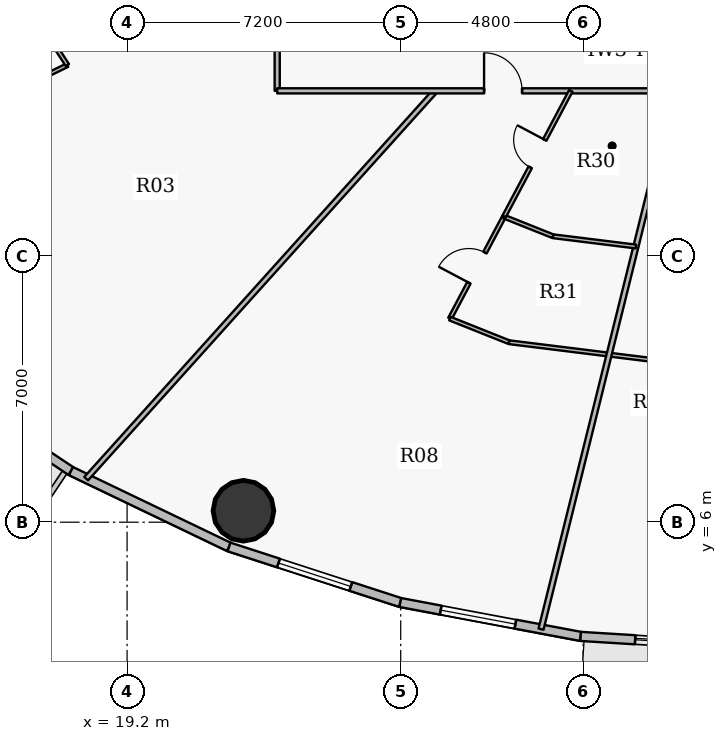
"""IFC4 building model, lengths in metres.
Left out: names, types, materials, properties, quantities, classifications, styles, units other than length and angle.
Written with IfcOpenShell. Run it as: python <this file> out.ifc"""

import sys

from ifc_helpers import new_model, si_unit, direction, frame, frame_2d, origin, origin_2d, place, context, subcontext, project, spatial, rectangle, hollow_circle, extrude, source, transform, mapped, element, fill, save


model = new_model("IFC4")
c1 = context("Model", 3, precision=1e-05, world=origin(), true_north=direction((0.0, 1.0)))
c2 = subcontext(c1, "Body", "Model", "MODEL_VIEW")
j1 = project(units=[si_unit("LENGTHUNIT", "METRE"), si_unit("PLANEANGLEUNIT", "RADIAN")], contexts=[c1])
p1 = place(None, origin())
s1 = spatial("IfcSite", under=j1, at=p1, CompositionType="ELEMENT")
p2 = place(p1, origin())
s2 = spatial("IfcBuilding", under=s1, at=p2, CompositionType="ELEMENT")
p3 = place(p2, frame((0.0, 0.0, 61.8)))
s3 = spatial("IfcBuildingStorey", under=s2, at=p3, CompositionType="ELEMENT", Elevation=61.8)
p4 = place(p3, frame((22.262, 6.301, 0.0), z_axis=(0.0, 0.0, 1.0), x_axis=(1.0, 0.0, 0.0)))
e1 = element("IfcColumn", 1, at=p4, inside=s3, PredefinedType="COLUMN", context=c2, shape_type="SweptSolid", body=[
    extrude(hollow_circle(Radius=0.8, WallThickness=0.045, at=origin_2d()), origin(), (0.0, 0.0, 1.0), 4.2),
])
p5 = place(p3, frame((17.723, 7.344, 0.0), z_axis=(0.0, 0.0, 1.0), x_axis=(-0.831240982525, 0.555912249343, 0.0)))
e2 = element("IfcWall", 2, at=p5, inside=s3, PredefinedType="SOLIDWALL", context=c2, shape_type="SweptSolid", body=[
    extrude(rectangle(XDim=4.46, YDim=0.24, at=frame_2d((2.23, 0.0))), origin(), (0.0, 0.0, 1.0), 3.95),
])
p6 = place(p5, frame((1.23, 0.0, 0.9)))
e3 = element("IfcOpeningElement", 3, at=p6, cuts=e2, PredefinedType="OPENING", context=c2, shape_type="SweptSolid", body=[
    extrude(rectangle(XDim=2.0, YDim=1.75, at=origin_2d()), frame((1.0, 0.13, 0.875), z_axis=(0.0, -1.0, 0.0), x_axis=(1.0, 0.0, 0.0)), (0.0, 0.0, 1.0), 0.26),
])
p7 = place(p3, frame((21.882, 5.349, 0.0), z_axis=(0.0, 0.0, 1.0), x_axis=(-0.901601503137, 0.432567601123, 0.0)))
e4 = element("IfcWall", 4, at=p7, inside=s3, PredefinedType="SOLIDWALL", context=c2, shape_type="SweptSolid", body=[
    extrude(rectangle(XDim=4.613, YDim=0.24, at=frame_2d((2.306, 0.0))), origin(), (0.0, 0.0, 1.0), 3.95),
])
p8 = place(p3, frame((26.389, 3.887, 0.0), z_axis=(0.0, 0.0, 1.0), x_axis=(-0.951207699013, 0.308551313946, 0.0)))
e5 = element("IfcWall", 5, at=p8, inside=s3, PredefinedType="SOLIDWALL", context=c2, shape_type="SweptSolid", body=[
    extrude(rectangle(XDim=4.739, YDim=0.24, at=frame_2d((2.369, 0.0))), origin(), (0.0, 0.0, 1.0), 3.95),
])
p9 = place(p8, frame((1.369, 0.0, 0.9)))
e6 = element("IfcOpeningElement", 6, at=p9, cuts=e5, PredefinedType="OPENING", context=c2, shape_type="SweptSolid", body=[
    extrude(rectangle(XDim=2.0, YDim=1.75, at=origin_2d()), frame((1.0, 0.13, 0.875), z_axis=(0.0, -1.0, 0.0), x_axis=(1.0, 0.0, 0.0)), (0.0, 0.0, 1.0), 0.26),
])
p10 = place(p3, frame((31.135, 2.995, 0.0), z_axis=(0.0, 0.0, 1.0), x_axis=(-0.982791952378, 0.184715939598, 0.0)))
e7 = element("IfcWall", 7, at=p10, inside=s3, PredefinedType="SOLIDWALL", context=c2, shape_type="SweptSolid", body=[
    extrude(rectangle(XDim=4.828, YDim=0.24, at=frame_2d((2.414, 0.0))), origin(), (0.0, 0.0, 1.0), 3.95),
])
p11 = place(p10, frame((1.746, 0.0, 0.9)))
e8 = element("IfcOpeningElement", 8, at=p11, cuts=e7, PredefinedType="OPENING", context=c2, shape_type="SweptSolid", body=[
    extrude(rectangle(XDim=2.0, YDim=1.75, at=origin_2d()), frame((1.0, 0.13, 0.875), z_axis=(0.0, -1.0, 0.0), x_axis=(1.0, 0.0, 0.0)), (0.0, 0.0, 1.0), 0.26),
])
p12 = place(p3, frame((36.0, 2.695, 0.0), z_axis=(0.0, 0.0, 1.0), x_axis=(-0.998106954071, 0.061502099433, 0.0)))
e9 = element("IfcWall", 9, at=p12, inside=s3, PredefinedType="SOLIDWALL", context=c2, shape_type="SweptSolid", body=[
    extrude(rectangle(XDim=4.875, YDim=0.24, at=frame_2d((2.438, 0.0))), origin(), (0.0, 0.0, 1.0), 3.95),
])
p13 = place(p12, frame((1.437, 0.0, 0.9)))
e10 = element("IfcOpeningElement", 10, at=p13, cuts=e9, PredefinedType="OPENING", context=c2, shape_type="SweptSolid", body=[
    extrude(rectangle(XDim=2.0, YDim=1.75, at=origin_2d()), frame((1.0, 0.13, 0.875), z_axis=(0.0, -1.0, 0.0), x_axis=(1.0, 0.0, 0.0)), (0.0, 0.0, 1.0), 0.26),
])
p14 = place(p3, frame((9.719, 14.163, 0.0), z_axis=(0.0, 0.0, 1.0), x_axis=(0.898526567573, 0.438919135339, 0.0)))
e11 = element("IfcWall", 11, at=p14, inside=s3, PredefinedType="PARTITIONING", context=c2, shape_type="SweptSolid", body=[
    extrude(rectangle(XDim=8.803, YDim=0.1, at=frame_2d((4.402, 0.0))), origin(), (0.0, 0.0, 1.0), 3.335),
])
p15 = place(p14, frame((6.191, 0.0, 0.0)))
e12 = element("IfcOpeningElement", 12, at=p15, cuts=e11, PredefinedType="OPENING", context=c2, shape_type="SweptSolid", body=[
    extrude(rectangle(XDim=0.9, YDim=2.1, at=origin_2d()), frame((0.45, 0.06, 1.05), z_axis=(0.0, -1.0, 0.0), x_axis=(1.0, 0.0, 0.0)), (0.0, 0.0, 1.0), 0.12),
])
p16 = place(p14, frame((0.843, 0.0, 0.0)))
e13 = element("IfcOpeningElement", 13, at=p16, cuts=e11, PredefinedType="OPENING", context=c2, shape_type="SweptSolid", body=[
    extrude(rectangle(XDim=0.82, YDim=2.1, at=origin_2d()), frame((0.41, 0.06, 1.05), z_axis=(0.0, -1.0, 0.0), x_axis=(1.0, 0.0, 0.0)), (0.0, 0.0, 1.0), 0.12),
])
p17 = place(p3, frame((15.229, 21.716, 0.0), z_axis=(0.0, 0.0, 1.0), x_axis=(0.545423102052, -0.838160867464, 0.0)))
e14 = element("IfcWall", 14, at=p17, inside=s3, PredefinedType="PARTITIONING", context=c2, shape_type="SweptSolid", body=[
    extrude(rectangle(XDim=4.401, YDim=0.1, at=frame_2d((2.2, 0.0))), origin(), (0.0, 0.0, 1.0), 3.285),
])
p18 = place(p3, frame((18.124, 7.146, 0.0), z_axis=(0.0, 0.0, 1.0), x_axis=(0.669125827692, 0.743149128181, 0.0)))
e15 = element("IfcWall", 15, at=p18, inside=s3, PredefinedType="PARTITIONING", context=c2, shape_type="SweptSolid", body=[
    extrude(rectangle(XDim=13.73, YDim=0.135, at=frame_2d((6.865, 0.0))), origin(), (0.0, 0.0, 1.0), 3.335),
])
p19 = place(p3, frame((23.15, 17.35, 0.0), z_axis=(0.0, 0.0, 1.0), x_axis=(0.0, 1.0, 0.0)))
e16 = element("IfcWall", 16, at=p19, inside=s3, PredefinedType="PARTITIONING", context=c2, shape_type="SweptSolid", body=[
    extrude(rectangle(XDim=6.011, YDim=0.135, at=frame_2d((3.006, 0.0))), origin(), (0.0, 0.0, 1.0), 3.285),
])
p20 = place(p19, frame((2.506, 0.0, 0.0)))
e17 = element("IfcOpeningElement", 17, at=p20, cuts=e16, PredefinedType="OPENING", context=c2, shape_type="SweptSolid", body=[
    extrude(rectangle(XDim=1.0, YDim=2.15, at=origin_2d()), frame((0.5, 0.078, 1.075), z_axis=(0.0, -1.0, 0.0), x_axis=(1.0, 0.0, 0.0)), (0.0, 0.0, 1.0), 0.155),
])
p21 = place(p3, frame((23.15, 17.35, 0.0), z_axis=(0.0, 0.0, 1.0), x_axis=(1.0, 0.0, 0.0)))
e18 = element("IfcWall", 18, at=p21, inside=s3, PredefinedType="PARTITIONING", context=c2, shape_type="SweptSolid", body=[
    extrude(rectangle(XDim=10.456, YDim=0.135, at=frame_2d((5.228, 0.0))), origin(), (0.0, 0.0, 1.0), 3.285),
])
p22 = place(p21, frame((5.444, 0.0, 0.0)))
e19 = element("IfcOpeningElement", 19, at=p22, cuts=e18, PredefinedType="OPENING", context=c2, shape_type="SweptSolid", body=[
    extrude(rectangle(XDim=1.0, YDim=2.15, at=origin_2d()), frame((0.5, 0.078, 1.075), z_axis=(0.0, -1.0, 0.0), x_axis=(1.0, 0.0, 0.0)), (0.0, 0.0, 1.0), 0.155),
])
p23 = place(p3, frame((27.694, 11.357, 0.0), z_axis=(0.0, 0.0, 1.0), x_axis=(0.468918098925, 0.883241652381, 0.0)))
e20 = element("IfcWall", 20, at=p23, inside=s3, PredefinedType="PARTITIONING", context=c2, shape_type="SweptSolid", body=[
    extrude(rectangle(XDim=3.036, YDim=0.1, at=frame_2d((1.518, 0.0))), origin(), (0.0, 0.0, 1.0), 3.95),
])
p24 = place(p23, frame((1.068, 0.0, 0.0)))
e21 = element("IfcOpeningElement", 21, at=p24, cuts=e20, PredefinedType="OPENING", context=c2, shape_type="SweptSolid", body=[
    extrude(rectangle(XDim=0.9, YDim=2.1, at=origin_2d()), frame((0.45, 0.06, 1.05), z_axis=(0.0, -1.0, 0.0), x_axis=(1.0, 0.0, 0.0)), (0.0, 0.0, 1.0), 0.12),
])
p25 = place(p3, frame((27.694, 11.357, 0.0), z_axis=(0.0, 0.0, 1.0), x_axis=(0.928847957875, -0.370461160112, 0.0)))
e22 = element("IfcWall", 22, at=p25, inside=s3, PredefinedType="PARTITIONING", context=c2, shape_type="SweptSolid", body=[
    extrude(rectangle(XDim=1.676, YDim=0.1, at=frame_2d((0.838, 0.0))), origin(), (0.0, 0.0, 1.0), 3.95),
])
p26 = place(p3, frame((29.118, 14.039, 0.0), z_axis=(0.0, 0.0, 1.0), x_axis=(0.928791597639, -0.370602439489, 0.0)))
e23 = element("IfcWall", 23, at=p26, inside=s3, PredefinedType="PARTITIONING", context=c2, shape_type="SweptSolid", body=[
    extrude(rectangle(XDim=1.389, YDim=0.1, at=frame_2d((0.694, 0.0))), origin(), (0.0, 0.0, 1.0), 3.95),
])
p27 = place(p3, frame((29.123, 14.048, 0.0), z_axis=(0.0, 0.0, 1.0), x_axis=(0.468940383898, 0.8832298208, 0.0)))
e24 = element("IfcWall", 24, at=p27, inside=s3, PredefinedType="PARTITIONING", context=c2, shape_type="SweptSolid", body=[
    extrude(rectangle(XDim=3.739, YDim=0.1, at=frame_2d((1.87, 0.0))), origin(), (0.0, 0.0, 1.0), 3.95),
])
p28 = place(p27, frame((1.46, 0.0, 0.0)))
e25 = element("IfcOpeningElement", 25, at=p28, cuts=e24, PredefinedType="OPENING", context=c2, shape_type="SweptSolid", body=[
    extrude(rectangle(XDim=0.82, YDim=2.1, at=origin_2d()), frame((0.41, 0.06, 1.05), z_axis=(0.0, -1.0, 0.0), x_axis=(1.0, 0.0, 0.0)), (0.0, 0.0, 1.0), 0.12),
])
p29 = place(p3, frame((29.251, 10.736, 0.0), z_axis=(0.0, 0.0, 1.0), x_axis=(0.992394520877, -0.123097989151, 0.0)))
e26 = element("IfcWall", 26, at=p29, inside=s3, PredefinedType="PARTITIONING", context=c2, shape_type="SweptSolid", body=[
    extrude(rectangle(XDim=6.801, YDim=0.1, at=frame_2d((3.4, 0.0))), origin(), (0.0, 0.0, 1.0), 3.285),
])
p30 = place(p3, frame((30.092, 3.186, 0.0), z_axis=(0.0, 0.0, 1.0), x_axis=(0.240785833135, 0.970578272249, 0.0)))
e27 = element("IfcWall", 27, at=p30, inside=s3, PredefinedType="PARTITIONING", context=c2, shape_type="SweptSolid", body=[
    extrude(rectangle(XDim=13.792, YDim=0.135, at=frame_2d((6.896, 0.0))), origin(), (0.0, 0.0, 1.0), 3.335),
])
p31 = place(p3, frame((30.408, 13.524, 0.0), z_axis=(0.0, 0.0, 1.0), x_axis=(0.992388521758, -0.123146343362, 0.0)))
e28 = element("IfcWall", 28, at=p31, inside=s3, PredefinedType="PARTITIONING", context=c2, shape_type="SweptSolid", body=[
    extrude(rectangle(XDim=2.199, YDim=0.1, at=frame_2d((1.099, 0.0))), origin(), (0.0, 0.0, 1.0), 3.95),
])
m1 = source(origin(), c2, "Body", "SweptSolid", [
    extrude(rectangle(XDim=2.0, YDim=1.75, at=origin_2d()), frame((1.0, 0.03, 0.875), z_axis=(0.0, -1.0, 0.0), x_axis=(1.0, 0.0, 0.0)), (0.0, 0.0, 1.0), 0.06),
])
p32 = place(p9, origin())
e29 = element("IfcWindow", 29, at=p32, inside=s3, PartitioningType="DOUBLE_PANEL_VERTICAL", PredefinedType="WINDOW", context=c2, shape_type="MappedRepresentation", body=[
    mapped(m1, transform((0.0, 0.0, 0.0), x_axis=(1.0, 0.0, 0.0), y_axis=(0.0, 1.0, 0.0), z_axis=(0.0, 0.0, 1.0), scale=1.0)),
])
fill(e6, e29)
p33 = place(p11, origin())
e30 = element("IfcWindow", 30, at=p33, inside=s3, PartitioningType="DOUBLE_PANEL_VERTICAL", PredefinedType="WINDOW", context=c2, shape_type="MappedRepresentation", body=[
    mapped(m1, transform((0.0, 0.0, 0.0), x_axis=(1.0, 0.0, 0.0), y_axis=(0.0, 1.0, 0.0), z_axis=(0.0, 0.0, 1.0), scale=1.0)),
])
fill(e8, e30)
p34 = place(p13, origin())
e31 = element("IfcWindow", 31, at=p34, inside=s3, PartitioningType="DOUBLE_PANEL_VERTICAL", PredefinedType="WINDOW", context=c2, shape_type="MappedRepresentation", body=[
    mapped(m1, transform((0.0, 0.0, 0.0), x_axis=(1.0, 0.0, 0.0), y_axis=(0.0, 1.0, 0.0), z_axis=(0.0, 0.0, 1.0), scale=1.0)),
])
fill(e10, e31)
m2 = source(origin(), c2, "Body", "SweptSolid", [
    extrude(rectangle(XDim=1.0, YDim=2.15, at=origin_2d()), frame((0.5, 0.025, 1.075), z_axis=(0.0, -1.0, 0.0), x_axis=(1.0, 0.0, 0.0)), (0.0, 0.0, 1.0), 0.05),
])
p35 = place(p22, origin())
e32 = element("IfcDoor", 32, at=p35, inside=s3, OperationType="SINGLE_SWING_LEFT", PredefinedType="DOOR", context=c2, shape_type="MappedRepresentation", body=[
    mapped(m2, transform((0.0, 0.0, 0.0), x_axis=(1.0, 0.0, 0.0), y_axis=(0.0, 1.0, 0.0), z_axis=(0.0, 0.0, 1.0), scale=1.0)),
])
fill(e19, e32)
m3 = source(origin(), c2, "Body", "SweptSolid", [
    extrude(rectangle(XDim=0.82, YDim=2.1, at=origin_2d()), frame((0.41, 0.025, 1.05), z_axis=(0.0, -1.0, 0.0), x_axis=(1.0, 0.0, 0.0)), (0.0, 0.0, 1.0), 0.05),
])
p36 = place(p28, origin())
e33 = element("IfcDoor", 33, at=p36, inside=s3, OperationType="SINGLE_SWING_RIGHT", PredefinedType="DOOR", context=c2, shape_type="MappedRepresentation", body=[
    mapped(m3, transform((0.0, 0.0, 0.0), x_axis=(1.0, 0.0, 0.0), y_axis=(0.0, 1.0, 0.0), z_axis=(0.0, 0.0, 1.0), scale=1.0)),
])
fill(e25, e33)
m4 = source(origin(), c2, "Body", "SweptSolid", [
    extrude(rectangle(XDim=0.9, YDim=2.1, at=origin_2d()), frame((0.45, 0.025, 1.05), z_axis=(0.0, -1.0, 0.0), x_axis=(1.0, 0.0, 0.0)), (0.0, 0.0, 1.0), 0.05),
])
p37 = place(p24, origin())
e34 = element("IfcDoor", 34, at=p37, inside=s3, OperationType="SINGLE_SWING_LEFT", PredefinedType="DOOR", context=c2, shape_type="MappedRepresentation", body=[
    mapped(m4, transform((0.0, 0.0, 0.0), x_axis=(1.0, 0.0, 0.0), y_axis=(0.0, 1.0, 0.0), z_axis=(0.0, 0.0, 1.0), scale=1.0)),
])
fill(e21, e34)
save(model, sys.argv[1])
